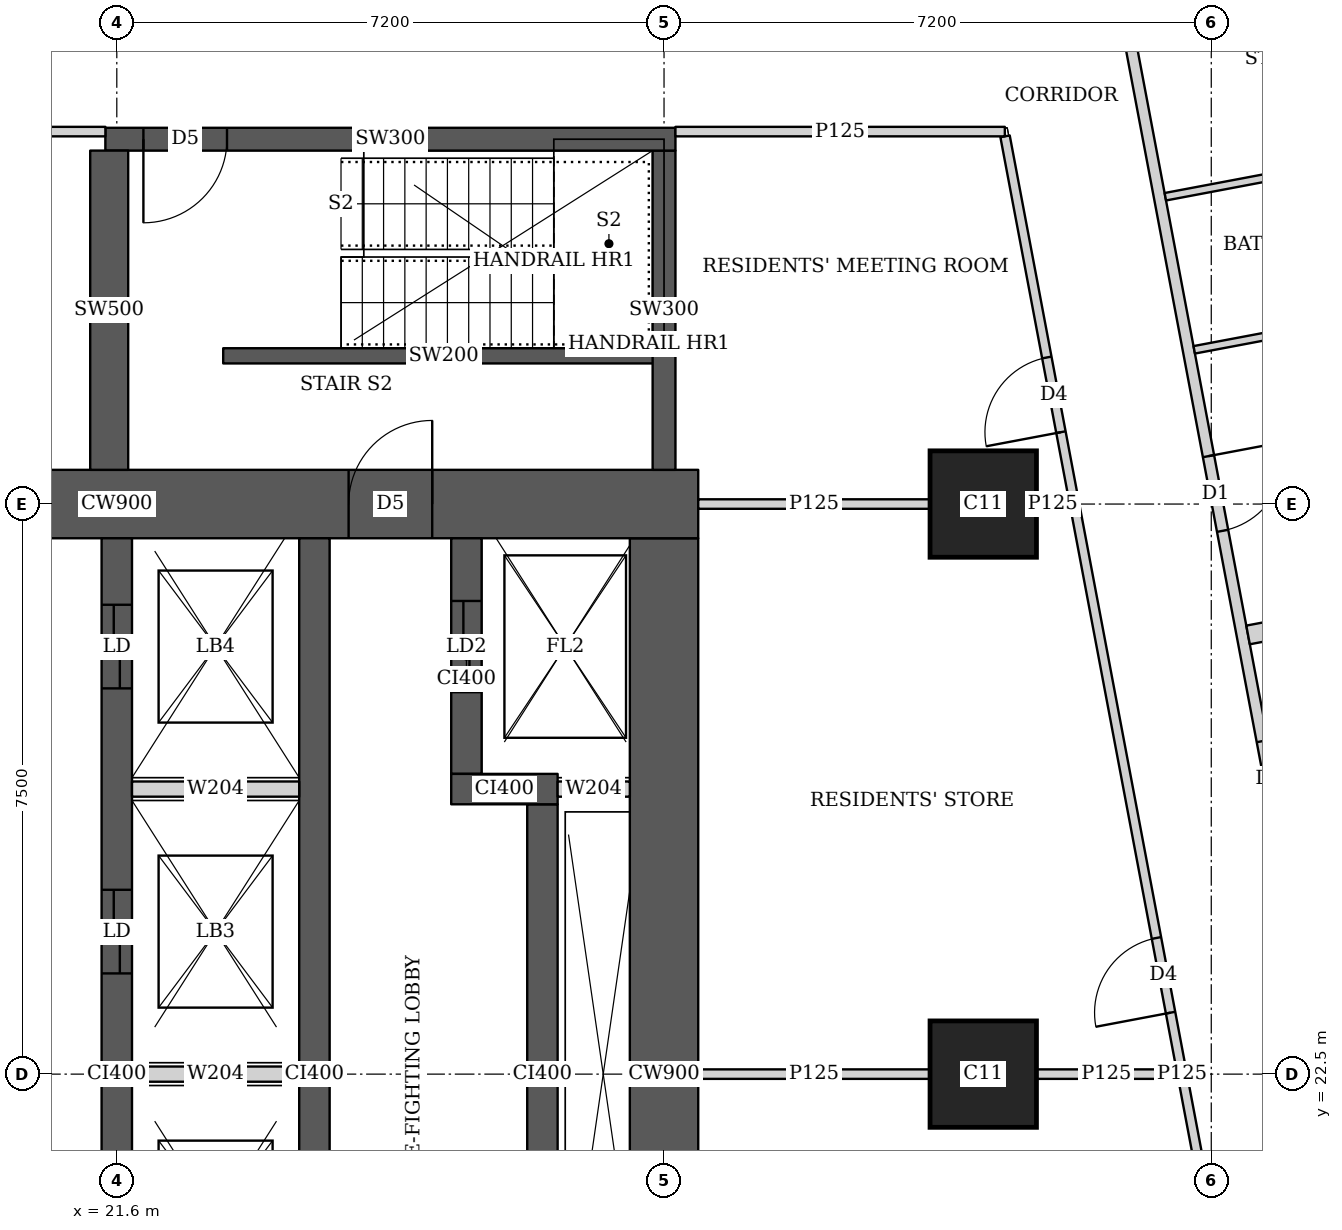
"""IFC4 building model, lengths in metres.
Left out: names, types, materials, properties, quantities, classifications, styles, units other than length and angle.
Written with IfcOpenShell. Run it as: python <this file> out.ifc"""

import sys

from ifc_helpers import new_model, si_unit, direction, frame, frame_2d, origin, origin_2d, place, context, subcontext, project, spatial, rectangle, extrude, element, fill, save


model = new_model("IFC4")
c1 = context("Model", 3, precision=1e-05, world=origin(), true_north=direction((0.0, 1.0)))
c2 = subcontext(c1, "Body", "Model", "MODEL_VIEW")
j1 = project(units=[si_unit("LENGTHUNIT", "METRE"), si_unit("PLANEANGLEUNIT", "RADIAN")], contexts=[c1])
p1 = place(None, origin())
s1 = spatial("IfcSite", under=j1, at=p1, CompositionType="ELEMENT")
p2 = place(p1, origin())
s2 = spatial("IfcBuilding", under=s1, at=p2, CompositionType="ELEMENT")
p3 = place(p2, frame((0.0, 0.0, 274.1)))
s3 = spatial("IfcBuildingStorey", under=s2, at=p3, CompositionType="ELEMENT", Elevation=274.1)
for number, where, z_axis, x_axis in (
    (1, (33.0, 22.5, 0.0), (0.0, 0.0, 1.0), (1.0, 0.0, 0.0)),
    (2, (33.0, 30.0, 0.0), (0.0, 0.0, 1.0), (1.0, 0.0, 0.0)),
):
    element("IfcColumn", number, at=place(p3, frame(where, z_axis=z_axis, x_axis=x_axis)), inside=s3, PredefinedType="COLUMN", context=c2, shape_type="SweptSolid", body=[
        extrude(rectangle(XDim=1.4, YDim=1.4, at=origin_2d()), origin(), (0.0, 0.0, 1.0), 3.75),
    ])
p4 = place(p3, frame((13.95, 30.0, 0.0), z_axis=(0.0, 0.0, 1.0), x_axis=(1.0, 0.0, 0.0)))
e3 = element("IfcWall", 3, at=p4, inside=s3, PredefinedType="SHEAR", context=c2, shape_type="SweptSolid", body=[
    extrude(rectangle(XDim=15.3, YDim=0.9, at=frame_2d((7.65, 0.0))), origin(), (0.0, 0.0, 1.0), 3.75),
])
p5 = place(p4, frame((4.45, 0.0, 0.0)))
e4 = element("IfcOpeningElement", 4, at=p5, cuts=e3, PredefinedType="OPENING", context=c2, shape_type="SweptSolid", body=[
    extrude(rectangle(XDim=1.8, YDim=2.1, at=frame_2d((0.9, 1.05))), frame((0.0, 0.46, 0.0), z_axis=(0.0, -1.0, 0.0), x_axis=(1.0, 0.0, 0.0)), (0.0, 0.0, 1.0), 0.92),
])
p6 = place(p4, frame((10.7, 0.0, 0.0)))
e5 = element("IfcOpeningElement", 5, at=p6, cuts=e3, PredefinedType="OPENING", context=c2, shape_type="SweptSolid", body=[
    extrude(rectangle(XDim=1.1, YDim=2.1, at=frame_2d((0.55, 1.05))), frame((0.0, 0.46, 0.0), z_axis=(0.0, -1.0, 0.0), x_axis=(1.0, 0.0, 0.0)), (0.0, 0.0, 1.0), 0.92),
])
p7 = place(p3, frame((28.8, 15.45, 0.0), z_axis=(0.0, 0.0, 1.0), x_axis=(0.0, 1.0, 0.0)))
e6 = element("IfcWall", 6, at=p7, inside=s3, PredefinedType="SHEAR", context=c2, shape_type="SweptSolid", body=[
    extrude(rectangle(XDim=14.1, YDim=0.9, at=frame_2d((7.05, 0.0))), origin(), (0.0, 0.0, 1.0), 3.75),
])
p8 = place(p3, frame((21.6, 15.45, 0.0), z_axis=(0.0, 0.0, 1.0), x_axis=(0.0, 1.0, 0.0)))
e7 = element("IfcWall", 7, at=p8, inside=s3, PredefinedType="SHEAR", context=c2, shape_type="SweptSolid", body=[
    extrude(rectangle(XDim=14.1, YDim=0.4, at=frame_2d((7.05, 0.0))), origin(), (0.0, 0.0, 1.0), 3.75),
])
p9 = place(p8, frame((0.875, 0.0, 0.0)))
e8 = element("IfcOpeningElement", 8, at=p9, cuts=e7, PredefinedType="OPENING", context=c2, shape_type="SweptSolid", body=[
    extrude(rectangle(XDim=1.1, YDim=2.1, at=frame_2d((0.55, 1.05))), frame((0.0, 0.21, 0.0), z_axis=(0.0, -1.0, 0.0), x_axis=(1.0, 0.0, 0.0)), (0.0, 0.0, 1.0), 0.42),
])
p10 = place(p8, frame((4.625, 0.0, 0.0)))
e9 = element("IfcOpeningElement", 9, at=p10, cuts=e7, PredefinedType="OPENING", context=c2, shape_type="SweptSolid", body=[
    extrude(rectangle(XDim=1.1, YDim=2.1, at=frame_2d((0.55, 1.05))), frame((0.0, 0.21, 0.0), z_axis=(0.0, -1.0, 0.0), x_axis=(1.0, 0.0, 0.0)), (0.0, 0.0, 1.0), 0.42),
])
p11 = place(p8, frame((8.375, 0.0, 0.0)))
e10 = element("IfcOpeningElement", 10, at=p11, cuts=e7, PredefinedType="OPENING", context=c2, shape_type="SweptSolid", body=[
    extrude(rectangle(XDim=1.1, YDim=2.1, at=frame_2d((0.55, 1.05))), frame((0.0, 0.21, 0.0), z_axis=(0.0, -1.0, 0.0), x_axis=(1.0, 0.0, 0.0)), (0.0, 0.0, 1.0), 0.42),
])
p12 = place(p8, frame((12.125, 0.0, 0.0)))
e11 = element("IfcOpeningElement", 11, at=p12, cuts=e7, PredefinedType="OPENING", context=c2, shape_type="SweptSolid", body=[
    extrude(rectangle(XDim=1.1, YDim=2.1, at=frame_2d((0.55, 1.05))), frame((0.0, 0.21, 0.0), z_axis=(0.0, -1.0, 0.0), x_axis=(1.0, 0.0, 0.0)), (0.0, 0.0, 1.0), 0.42),
])
p13 = place(p3, frame((24.2, 15.45, 0.0), z_axis=(0.0, 0.0, 1.0), x_axis=(0.0, 1.0, 0.0)))
e12 = element("IfcWall", 12, at=p13, inside=s3, PredefinedType="SHEAR", context=c2, shape_type="SweptSolid", body=[
    extrude(rectangle(XDim=14.1, YDim=0.4, at=frame_2d((7.05, 0.0))), origin(), (0.0, 0.0, 1.0), 3.75),
])
p14 = place(p3, frame((27.2, 18.95, 0.0), z_axis=(0.0, 0.0, 1.0), x_axis=(0.0, 1.0, 0.0)))
e13 = element("IfcWall", 13, at=p14, inside=s3, PredefinedType="SHEAR", context=c2, shape_type="SweptSolid", body=[
    extrude(rectangle(XDim=7.1, YDim=0.4, at=frame_2d((3.55, 0.0))), origin(), (0.0, 0.0, 1.0), 3.75),
])
p15 = place(p3, frame((26.0, 26.25, 0.0), z_axis=(0.0, 0.0, 1.0), x_axis=(1.0, 0.0, 0.0)))
e14 = element("IfcWall", 14, at=p15, inside=s3, PredefinedType="SHEAR", context=c2, shape_type="SweptSolid", body=[
    extrude(rectangle(XDim=1.4, YDim=0.4, at=frame_2d((0.7, 0.0))), origin(), (0.0, 0.0, 1.0), 3.75),
])
p16 = place(p3, frame((26.2, 26.45, 0.0), z_axis=(0.0, 0.0, 1.0), x_axis=(0.0, 1.0, 0.0)))
e15 = element("IfcWall", 15, at=p16, inside=s3, PredefinedType="SHEAR", context=c2, shape_type="SweptSolid", body=[
    extrude(rectangle(XDim=3.1, YDim=0.4, at=frame_2d((1.55, 0.0))), origin(), (0.0, 0.0, 1.0), 3.75),
])
p17 = place(p16, frame((1.075, 0.0, 0.0)))
e16 = element("IfcOpeningElement", 16, at=p17, cuts=e15, PredefinedType="OPENING", context=c2, shape_type="SweptSolid", body=[
    extrude(rectangle(XDim=1.2, YDim=2.1, at=frame_2d((0.6, 1.05))), frame((0.0, 0.21, 0.0), z_axis=(0.0, -1.0, 0.0), x_axis=(1.0, 0.0, 0.0)), (0.0, 0.0, 1.0), 0.42),
])
p18 = place(p3, frame((21.45, 34.8, 0.0), z_axis=(0.0, 0.0, 1.0), x_axis=(1.0, 0.0, 0.0)))
e17 = element("IfcWall", 17, at=p18, inside=s3, PredefinedType="SHEAR", context=c2, shape_type="SweptSolid", body=[
    extrude(rectangle(XDim=7.5, YDim=0.3, at=frame_2d((3.75, 0.0))), origin(), (0.0, 0.0, 1.0), 3.75),
])
p19 = place(p18, frame((0.5, 0.0, 0.0)))
e18 = element("IfcOpeningElement", 18, at=p19, cuts=e17, PredefinedType="OPENING", context=c2, shape_type="SweptSolid", body=[
    extrude(rectangle(XDim=1.1, YDim=2.1, at=frame_2d((0.55, 1.05))), frame((0.0, 0.16, 0.0), z_axis=(0.0, -1.0, 0.0), x_axis=(1.0, 0.0, 0.0)), (0.0, 0.0, 1.0), 0.32),
])
p20 = place(p3, frame((21.5, 30.45, 0.0), z_axis=(0.0, 0.0, 1.0), x_axis=(0.0, 1.0, 0.0)))
e19 = element("IfcWall", 19, at=p20, inside=s3, PredefinedType="SHEAR", context=c2, shape_type="SweptSolid", body=[
    extrude(rectangle(XDim=4.2, YDim=0.5, at=frame_2d((2.1, 0.0))), origin(), (0.0, 0.0, 1.0), 3.75),
])
p21 = place(p3, frame((28.8, 30.45, 0.0), z_axis=(0.0, 0.0, 1.0), x_axis=(0.0, 1.0, 0.0)))
e20 = element("IfcWall", 20, at=p21, inside=s3, PredefinedType="SHEAR", context=c2, shape_type="SweptSolid", body=[
    extrude(rectangle(XDim=4.2, YDim=0.3, at=frame_2d((2.1, 0.0))), origin(), (0.0, 0.0, 1.0), 3.75),
])
p22 = place(p3, frame((33.781, 42.186, 0.0), z_axis=(0.0, 0.0, 1.0), x_axis=(0.185593518645, -0.9826266055, 0.0)))
e21 = element("IfcWall", 21, at=p22, inside=s3, PredefinedType="SOLIDWALL", context=c2, shape_type="SweptSolid", body=[
    extrude(rectangle(XDim=35.961, YDim=0.15, at=frame_2d((17.98, 0.0))), origin(), (0.0, 0.0, 1.0), 2.5),
])
p23 = place(p22, frame((11.76, 0.0, 0.0)))
e22 = element("IfcOpeningElement", 22, at=p23, cuts=e21, PredefinedType="OPENING", context=c2, shape_type="SweptSolid", body=[
    extrude(rectangle(XDim=1.0, YDim=2.1, at=frame_2d((0.5, 1.05))), frame((0.0, 0.085, 0.0), z_axis=(0.0, -1.0, 0.0), x_axis=(1.0, 0.0, 0.0)), (0.0, 0.0, 1.0), 0.17),
])
p24 = place(p22, frame((15.576, 0.0, 0.0)))
e23 = element("IfcOpeningElement", 23, at=p24, cuts=e21, PredefinedType="OPENING", context=c2, shape_type="SweptSolid", body=[
    extrude(rectangle(XDim=1.0, YDim=2.1, at=frame_2d((0.5, 1.05))), frame((0.0, 0.085, 0.0), z_axis=(0.0, -1.0, 0.0), x_axis=(1.0, 0.0, 0.0)), (0.0, 0.0, 1.0), 0.17),
])
p25 = place(p22, frame((30.502, 0.0, 0.0)))
e24 = element("IfcOpeningElement", 24, at=p25, cuts=e21, PredefinedType="OPENING", context=c2, shape_type="SweptSolid", body=[
    extrude(rectangle(XDim=1.0, YDim=2.1, at=frame_2d((0.5, 1.05))), frame((0.0, 0.085, 0.0), z_axis=(0.0, -1.0, 0.0), x_axis=(1.0, 0.0, 0.0)), (0.0, 0.0, 1.0), 0.17),
])
p26 = place(p3, frame((39.289, 32.692, 0.0), z_axis=(0.0, 0.0, 1.0), x_axis=(-0.982662827464, -0.185401638399, 0.0)))
e25 = element("IfcWall", 25, at=p26, inside=s3, PredefinedType="PARTITIONING", context=c2, shape_type="SweptSolid", body=[
    extrude(rectangle(XDim=3.575, YDim=0.1, at=frame_2d((1.788, 0.0))), origin(), (0.0, 0.0, 1.0), 3.5),
])
p27 = place(p3, frame((38.859, 34.697, 0.0), z_axis=(0.0, 0.0, 1.0), x_axis=(-0.982626628545, -0.185593396635, 0.0)))
e26 = element("IfcWall", 26, at=p27, inside=s3, PredefinedType="PARTITIONING", context=c2, shape_type="SweptSolid", body=[
    extrude(rectangle(XDim=3.524, YDim=0.1, at=frame_2d((1.762, 0.0))), origin(), (0.0, 0.0, 1.0), 3.5),
])
p28 = place(p3, frame((41.177, 29.164, 0.0), z_axis=(0.0, 0.0, 1.0), x_axis=(-0.982642846239, -0.185507511263, 0.0)))
e27 = element("IfcWall", 27, at=p28, inside=s3, PredefinedType="SOLIDWALL", context=c2, shape_type="SweptSolid", body=[
    extrude(rectangle(XDim=4.776, YDim=0.25, at=frame_2d((2.388, 0.0))), origin(), (0.0, 0.0, 1.0), 2.5),
])
p29 = place(p3, frame((13.75, 34.9, 0.0), z_axis=(0.0, 0.0, 1.0), x_axis=(1.0, 0.0, 0.0)))
e28 = element("IfcWall", 28, at=p29, inside=s3, PredefinedType="PARTITIONING", context=c2, shape_type="SweptSolid", body=[
    extrude(rectangle(XDim=7.7, YDim=0.125, at=frame_2d((3.85, 0.0))), origin(), (0.0, 0.0, 1.0), 3.5),
])
p30 = place(p29, frame((4.15, 0.0, 0.0)))
e29 = element("IfcOpeningElement", 29, at=p30, cuts=e28, PredefinedType="OPENING", context=c2, shape_type="SweptSolid", body=[
    extrude(rectangle(XDim=1.8, YDim=2.1, at=frame_2d((0.9, 1.05))), frame((0.0, 0.073, 0.0), z_axis=(0.0, -1.0, 0.0), x_axis=(1.0, 0.0, 0.0)), (0.0, 0.0, 1.0), 0.145),
])
p31 = place(p3, frame((28.95, 34.9, 0.0), z_axis=(0.0, 0.0, 1.0), x_axis=(1.0, 0.0, 0.0)))
e30 = element("IfcWall", 30, at=p31, inside=s3, PredefinedType="PARTITIONING", context=c2, shape_type="SweptSolid", body=[
    extrude(rectangle(XDim=4.334, YDim=0.125, at=frame_2d((2.167, 0.0))), origin(), (0.0, 0.0, 1.0), 3.5),
])
p32 = place(p3, frame((37.947, 10.163, 0.0), z_axis=(0.0, 0.0, 1.0), x_axis=(-0.185572770922, 0.982630523998, 0.0)))
e31 = element("IfcWall", 31, at=p32, inside=s3, PredefinedType="PARTITIONING", context=c2, shape_type="SweptSolid", body=[
    extrude(rectangle(XDim=25.111, YDim=0.125, at=frame_2d((12.556, 0.0))), origin(), (0.0, 0.0, 1.0), 2.5),
])
p33 = place(p32, frame((0.708, 0.0, 0.0)))
e32 = element("IfcOpeningElement", 32, at=p33, cuts=e31, PredefinedType="OPENING", context=c2, shape_type="SweptSolid", body=[
    extrude(rectangle(XDim=1.0, YDim=2.1, at=frame_2d((0.5, 1.05))), frame((0.0, 0.073, 0.0), z_axis=(0.0, -1.0, 0.0), x_axis=(1.0, 0.0, 0.0)), (0.0, 0.0, 1.0), 0.145),
])
p34 = place(p32, frame((5.9, 0.0, 0.0)))
e33 = element("IfcOpeningElement", 33, at=p34, cuts=e31, PredefinedType="OPENING", context=c2, shape_type="SweptSolid", body=[
    extrude(rectangle(XDim=1.0, YDim=2.1, at=frame_2d((0.5, 1.05))), frame((0.0, 0.073, 0.0), z_axis=(0.0, -1.0, 0.0), x_axis=(1.0, 0.0, 0.0)), (0.0, 0.0, 1.0), 0.145),
])
p35 = place(p32, frame((13.378, 0.0, 0.0)))
e34 = element("IfcOpeningElement", 34, at=p35, cuts=e31, PredefinedType="OPENING", context=c2, shape_type="SweptSolid", body=[
    extrude(rectangle(XDim=1.0, YDim=2.1, at=frame_2d((0.5, 1.05))), frame((0.0, 0.073, 0.0), z_axis=(0.0, -1.0, 0.0), x_axis=(1.0, 0.0, 0.0)), (0.0, 0.0, 1.0), 0.145),
])
p36 = place(p32, frame((21.15, 0.0, 0.0)))
e35 = element("IfcOpeningElement", 35, at=p36, cuts=e31, PredefinedType="OPENING", context=c2, shape_type="SweptSolid", body=[
    extrude(rectangle(XDim=1.0, YDim=2.1, at=frame_2d((0.5, 1.05))), frame((0.0, 0.073, 0.0), z_axis=(0.0, -1.0, 0.0), x_axis=(1.0, 0.0, 0.0)), (0.0, 0.0, 1.0), 0.145),
])
p37 = place(p3, frame((29.25, 22.5, 0.0), z_axis=(0.0, 0.0, 1.0), x_axis=(1.0, 0.0, 0.0)))
e36 = element("IfcWall", 36, at=p37, inside=s3, PredefinedType="PARTITIONING", context=c2, shape_type="SweptSolid", body=[
    extrude(rectangle(XDim=3.049, YDim=0.125, at=frame_2d((1.524, 0.0))), origin(), (0.0, 0.0, 1.0), 3.5),
])
p38 = place(p3, frame((33.701, 22.5, 0.0), z_axis=(0.0, 0.0, 1.0), x_axis=(1.0, 0.0, 0.0)))
e37 = element("IfcWall", 37, at=p38, inside=s3, PredefinedType="PARTITIONING", context=c2, shape_type="SweptSolid", body=[
    extrude(rectangle(XDim=1.841, YDim=0.125, at=frame_2d((0.92, 0.0))), origin(), (0.0, 0.0, 1.0), 2.5),
])
p39 = place(p3, frame((29.25, 30.0, 0.0), z_axis=(0.0, 0.0, 1.0), x_axis=(1.0, 0.0, 0.0)))
e38 = element("IfcWall", 38, at=p39, inside=s3, PredefinedType="PARTITIONING", context=c2, shape_type="SweptSolid", body=[
    extrude(rectangle(XDim=3.049, YDim=0.125, at=frame_2d((1.524, 0.0))), origin(), (0.0, 0.0, 1.0), 3.5),
])
p40 = place(p3, frame((33.701, 30.0, 0.0), z_axis=(0.0, 0.0, 1.0), x_axis=(1.0, 0.0, 0.0)))
e39 = element("IfcWall", 39, at=p40, inside=s3, PredefinedType="PARTITIONING", context=c2, shape_type="SweptSolid", body=[
    extrude(rectangle(XDim=0.424, YDim=0.125, at=frame_2d((0.212, 0.0))), origin(), (0.0, 0.0, 1.0), 2.5),
])
p41 = place(p3, frame((23.0, 31.95, 0.0), z_axis=(0.0, 0.0, 1.0), x_axis=(1.0, 0.0, 0.0)))
e40 = element("IfcWall", 40, at=p41, inside=s3, PredefinedType="SHEAR", context=c2, shape_type="SweptSolid", body=[
    extrude(rectangle(XDim=5.8, YDim=0.2, at=frame_2d((2.9, 0.0))), origin(), (0.0, 0.0, 1.0), 3.75),
])
for number, where, z_axis, x_axis in (
    (41, (21.8, 22.5, 0.0), (0.0, 0.0, 1.0), (1.0, 0.0, 0.0)),
    (42, (21.8, 26.25, 0.0), (0.0, 0.0, 1.0), (1.0, 0.0, 0.0)),
):
    element("IfcWall", number, at=place(p3, frame(where, z_axis=z_axis, x_axis=x_axis)), inside=s3, PredefinedType="SOLIDWALL", context=c2, shape_type="SweptSolid", body=[
        extrude(rectangle(XDim=2.2, YDim=0.2, at=frame_2d((1.1, 0.0))), origin(), (0.0, 0.0, 1.0), 3.5),
    ])
p42 = place(p3, frame((27.4, 26.25, 0.0), z_axis=(0.0, 0.0, 1.0), x_axis=(1.0, 0.0, 0.0)))
e43 = element("IfcWall", 43, at=p42, inside=s3, PredefinedType="SOLIDWALL", context=c2, shape_type="SweptSolid", body=[
    extrude(rectangle(XDim=0.95, YDim=0.2, at=frame_2d((0.475, 0.0))), origin(), (0.0, 0.0, 1.0), 3.5),
])
p43 = place(p23, origin())
e44 = element("IfcDoor", 44, at=p43, inside=s3, OperationType="SINGLE_SWING_LEFT", PredefinedType="DOOR", context=c2, shape_type="SweptSolid", body=[
    extrude(rectangle(XDim=1.0, YDim=2.1, at=frame_2d((0.5, 1.05))), frame((0.0, 0.025, 0.0), z_axis=(0.0, -1.0, 0.0), x_axis=(1.0, 0.0, 0.0)), (0.0, 0.0, 1.0), 0.05),
])
fill(e22, e44)
p44 = place(p24, origin())
e45 = element("IfcDoor", 45, at=p44, inside=s3, OperationType="SINGLE_SWING_RIGHT", PredefinedType="DOOR", context=c2, shape_type="SweptSolid", body=[
    extrude(rectangle(XDim=1.0, YDim=2.1, at=frame_2d((0.5, 1.05))), frame((0.0, 0.025, 0.0), z_axis=(0.0, -1.0, 0.0), x_axis=(1.0, 0.0, 0.0)), (0.0, 0.0, 1.0), 0.05),
])
fill(e23, e45)
p45 = place(p35, origin())
e46 = element("IfcDoor", 46, at=p45, inside=s3, OperationType="SINGLE_SWING_LEFT", PredefinedType="DOOR", context=c2, shape_type="SweptSolid", body=[
    extrude(rectangle(XDim=1.0, YDim=2.1, at=frame_2d((0.5, 1.05))), frame((0.0, 0.025, 0.0), z_axis=(0.0, -1.0, 0.0), x_axis=(1.0, 0.0, 0.0)), (0.0, 0.0, 1.0), 0.05),
])
fill(e34, e46)
p46 = place(p36, origin())
e47 = element("IfcDoor", 47, at=p46, inside=s3, OperationType="SINGLE_SWING_LEFT", PredefinedType="DOOR", context=c2, shape_type="SweptSolid", body=[
    extrude(rectangle(XDim=1.0, YDim=2.1, at=frame_2d((0.5, 1.05))), frame((0.0, 0.025, 0.0), z_axis=(0.0, -1.0, 0.0), x_axis=(1.0, 0.0, 0.0)), (0.0, 0.0, 1.0), 0.05),
])
fill(e35, e47)
p47 = place(p6, origin())
e48 = element("IfcDoor", 48, at=p47, inside=s3, OperationType="SINGLE_SWING_RIGHT", PredefinedType="DOOR", context=c2, shape_type="SweptSolid", body=[
    extrude(rectangle(XDim=1.1, YDim=2.1, at=frame_2d((0.55, 1.05))), frame((0.0, 0.025, 0.0), z_axis=(0.0, -1.0, 0.0), x_axis=(1.0, 0.0, 0.0)), (0.0, 0.0, 1.0), 0.05),
])
fill(e5, e48)
p48 = place(p17, origin())
e49 = element("IfcDoor", 49, at=p48, inside=s3, OperationType="DOUBLE_DOOR_SLIDING", PredefinedType="DOOR", context=c2, shape_type="SweptSolid", body=[
    extrude(rectangle(XDim=1.2, YDim=2.1, at=frame_2d((0.6, 1.05))), frame((0.0, 0.025, 0.0), z_axis=(0.0, -1.0, 0.0), x_axis=(1.0, 0.0, 0.0)), (0.0, 0.0, 1.0), 0.05),
])
fill(e16, e49)
p49 = place(p11, origin())
e50 = element("IfcDoor", 50, at=p49, inside=s3, OperationType="DOUBLE_DOOR_SLIDING", PredefinedType="DOOR", context=c2, shape_type="SweptSolid", body=[
    extrude(rectangle(XDim=1.1, YDim=2.1, at=frame_2d((0.55, 1.05))), frame((0.0, 0.025, 0.0), z_axis=(0.0, -1.0, 0.0), x_axis=(1.0, 0.0, 0.0)), (0.0, 0.0, 1.0), 0.05),
])
fill(e10, e50)
p50 = place(p12, origin())
e51 = element("IfcDoor", 51, at=p50, inside=s3, OperationType="DOUBLE_DOOR_SLIDING", PredefinedType="DOOR", context=c2, shape_type="SweptSolid", body=[
    extrude(rectangle(XDim=1.1, YDim=2.1, at=frame_2d((0.55, 1.05))), frame((0.0, 0.025, 0.0), z_axis=(0.0, -1.0, 0.0), x_axis=(1.0, 0.0, 0.0)), (0.0, 0.0, 1.0), 0.05),
])
fill(e11, e51)
p51 = place(p19, origin())
e52 = element("IfcDoor", 52, at=p51, inside=s3, OperationType="SINGLE_SWING_RIGHT", PredefinedType="DOOR", context=c2, shape_type="SweptSolid", body=[
    extrude(rectangle(XDim=1.1, YDim=2.1, at=frame_2d((0.55, 1.05))), frame((0.0, 0.025, 0.0), z_axis=(0.0, -1.0, 0.0), x_axis=(1.0, 0.0, 0.0)), (0.0, 0.0, 1.0), 0.05),
])
fill(e18, e52)
save(model, sys.argv[1])
